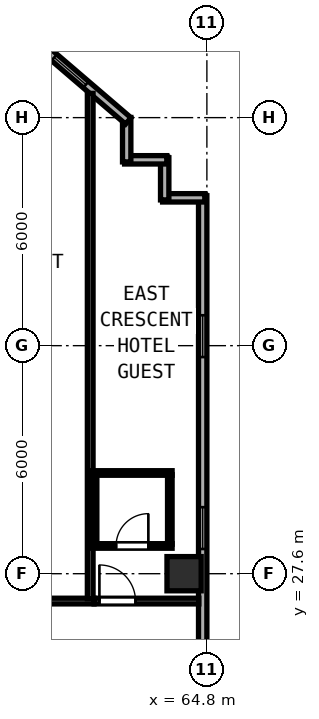
"""IFC4 building model, lengths in metres.
Left out: names, types, materials, properties, quantities, classifications, styles, units other than length and angle.
Written with IfcOpenShell. Run it as: python <this file> out.ifc"""

import sys

from ifc_helpers import new_model, si_unit, direction, frame, frame_2d, origin, origin_2d, place, context, subcontext, project, spatial, rectangle, hollow_rectangle, extrude, element, fill, save


model = new_model("IFC4")
c1 = context("Model", 3, precision=1e-05, world=origin(), true_north=direction((0.0, 1.0)))
c2 = subcontext(c1, "Body", "Model", "MODEL_VIEW")
j1 = project(units=[si_unit("LENGTHUNIT", "METRE"), si_unit("PLANEANGLEUNIT", "RADIAN")], contexts=[c1])
p1 = place(None, origin())
s1 = spatial("IfcSite", under=j1, at=p1, CompositionType="ELEMENT")
p2 = place(p1, origin())
s2 = spatial("IfcBuilding", under=s1, at=p2, CompositionType="ELEMENT")
p3 = place(p2, frame((0.0, 0.0, 215.4)))
s3 = spatial("IfcBuildingStorey", under=s2, at=p3, CompositionType="ELEMENT", Elevation=215.4)
p4 = place(p3, frame((64.2, 27.6, 0.0), z_axis=(0.0, 0.0, 1.0), x_axis=(1.0, 0.0, 0.0)))
e1 = element("IfcColumn", 1, at=p4, inside=s3, PredefinedType="COLUMN", context=c2, shape_type="SweptSolid", body=[
    extrude(hollow_rectangle(XDim=0.9, YDim=0.9, WallThickness=0.034, at=origin_2d()), origin(), (0.0, 0.0, 1.0), 3.8),
])
p5 = place(p3, frame((64.69, 16.4, 0.0), z_axis=(0.0, 0.0, 1.0), x_axis=(0.0, 1.0, 0.0)))
e2 = element("IfcWall", 2, at=p5, inside=s3, PredefinedType="SOLIDWALL", context=c2, shape_type="SweptSolid", body=[
    extrude(rectangle(XDim=21.145, YDim=0.22, at=frame_2d((10.573, 0.0))), origin(), (0.0, 0.0, 1.0), 3.62),
])
p6 = place(p5, frame((1.05, 0.0, 0.85)))
e3 = element("IfcOpeningElement", 3, at=p6, cuts=e2, PredefinedType="OPENING", context=c2, shape_type="SweptSolid", body=[
    extrude(rectangle(XDim=1.1, YDim=1.75, at=frame_2d((0.55, 0.875))), frame((0.0, 0.12, 0.0), z_axis=(0.0, -1.0, 0.0), x_axis=(1.0, 0.0, 0.0)), (0.0, 0.0, 1.0), 0.24),
])
p7 = place(p5, frame((6.1, 0.0, 0.85)))
e4 = element("IfcOpeningElement", 4, at=p7, cuts=e2, PredefinedType="OPENING", context=c2, shape_type="SweptSolid", body=[
    extrude(rectangle(XDim=1.1, YDim=1.75, at=frame_2d((0.55, 0.875))), frame((0.0, 0.12, 0.0), z_axis=(0.0, -1.0, 0.0), x_axis=(1.0, 0.0, 0.0)), (0.0, 0.0, 1.0), 0.24),
])
p8 = place(p5, frame((11.85, 0.0, 0.85)))
e5 = element("IfcOpeningElement", 5, at=p8, cuts=e2, PredefinedType="OPENING", context=c2, shape_type="SweptSolid", body=[
    extrude(rectangle(XDim=1.1, YDim=1.75, at=frame_2d((0.55, 0.875))), frame((0.0, 0.12, 0.0), z_axis=(0.0, -1.0, 0.0), x_axis=(1.0, 0.0, 0.0)), (0.0, 0.0, 1.0), 0.24),
])
p9 = place(p5, frame((16.9, 0.0, 0.85)))
e6 = element("IfcOpeningElement", 6, at=p9, cuts=e2, PredefinedType="OPENING", context=c2, shape_type="SweptSolid", body=[
    extrude(rectangle(XDim=1.1, YDim=1.75, at=frame_2d((0.55, 0.875))), frame((0.0, 0.12, 0.0), z_axis=(0.0, -1.0, 0.0), x_axis=(1.0, 0.0, 0.0)), (0.0, 0.0, 1.0), 0.24),
])
p10 = place(p3, frame((64.745, 37.49, 0.0), z_axis=(0.0, 0.0, 1.0), x_axis=(-1.0, 0.0, 0.0)))
e7 = element("IfcWall", 7, at=p10, inside=s3, PredefinedType="SOLIDWALL", context=c2, shape_type="SweptSolid", body=[
    extrude(rectangle(XDim=1.11, YDim=0.22, at=frame_2d((0.555, 0.0))), origin(), (0.0, 0.0, 1.0), 3.62),
])
p11 = place(p3, frame((63.69, 37.435, 0.0), z_axis=(0.0, 0.0, 1.0), x_axis=(0.0, 1.0, 0.0)))
e8 = element("IfcWall", 8, at=p11, inside=s3, PredefinedType="SOLIDWALL", context=c2, shape_type="SweptSolid", body=[
    extrude(rectangle(XDim=1.11, YDim=0.22, at=frame_2d((0.555, 0.0))), origin(), (0.0, 0.0, 1.0), 3.62),
])
p12 = place(p3, frame((63.745, 38.49, 0.0), z_axis=(0.0, 0.0, 1.0), x_axis=(-1.0, 0.0, 0.0)))
e9 = element("IfcWall", 9, at=p12, inside=s3, PredefinedType="SOLIDWALL", context=c2, shape_type="SweptSolid", body=[
    extrude(rectangle(XDim=1.11, YDim=0.22, at=frame_2d((0.555, 0.0))), origin(), (0.0, 0.0, 1.0), 3.62),
])
p13 = place(p3, frame((62.69, 38.435, 0.0), z_axis=(0.0, 0.0, 1.0), x_axis=(0.0, 1.0, 0.0)))
e10 = element("IfcWall", 10, at=p13, inside=s3, PredefinedType="SOLIDWALL", context=c2, shape_type="SweptSolid", body=[
    extrude(rectangle(XDim=1.169, YDim=0.22, at=frame_2d((0.585, 0.0))), origin(), (0.0, 0.0, 1.0), 3.62),
])
p14 = place(p3, frame((62.732, 39.514, 0.0), z_axis=(0.0, 0.0, 1.0), x_axis=(-0.759251976569, 0.65079677018, 0.0)))
e11 = element("IfcWall", 11, at=p14, inside=s3, PredefinedType="SOLIDWALL", context=c2, shape_type="SweptSolid", body=[
    extrude(rectangle(XDim=3.726, YDim=0.22, at=frame_2d((1.863, 0.0))), origin(), (0.0, 0.0, 1.0), 3.62),
])
p15 = place(p14, frame((1.467, 0.0, 0.85)))
e12 = element("IfcOpeningElement", 12, at=p15, cuts=e11, PredefinedType="OPENING", context=c2, shape_type="SweptSolid", body=[
    extrude(rectangle(XDim=1.1, YDim=1.75, at=frame_2d((0.55, 0.875))), frame((0.0, 0.12, 0.0), z_axis=(0.0, -1.0, 0.0), x_axis=(1.0, 0.0, 0.0)), (0.0, 0.0, 1.0), 0.24),
])
p16 = place(p3, frame((57.972, 26.88, 0.0), z_axis=(0.0, 0.0, 1.0), x_axis=(1.0, 0.0, 0.0)))
e13 = element("IfcWall", 13, at=p16, inside=s3, PredefinedType="PARTITIONING", context=c2, shape_type="SweptSolid", body=[
    extrude(rectangle(XDim=3.858, YDim=0.15, at=frame_2d((1.929, 0.0))), origin(), (0.0, 0.0, 1.0), 3.62),
])
p17 = place(p16, frame((0.14, 0.0, 0.0)))
e14 = element("IfcOpeningElement", 14, at=p17, cuts=e13, PredefinedType="OPENING", context=c2, shape_type="SweptSolid", body=[
    extrude(rectangle(XDim=0.95, YDim=2.15, at=frame_2d((0.475, 1.075))), frame((0.0, 0.085, 0.0), z_axis=(0.0, -1.0, 0.0), x_axis=(1.0, 0.0, 0.0)), (0.0, 0.0, 1.0), 0.17),
])
p18 = place(p3, frame((61.73, 26.94, 0.0), z_axis=(0.0, 0.0, 1.0), x_axis=(0.0, 1.0, 0.0)))
e15 = element("IfcWall", 15, at=p18, inside=s3, PredefinedType="PARTITIONING", context=c2, shape_type="SweptSolid", body=[
    extrude(rectangle(XDim=13.298, YDim=0.15, at=frame_2d((6.649, 0.0))), origin(), (0.0, 0.0, 1.0), 3.62),
])
p19 = place(p3, frame((61.832, 26.88, 0.0), z_axis=(0.0, 0.0, 1.0), x_axis=(1.0, 0.0, 0.0)))
e16 = element("IfcWall", 16, at=p19, inside=s3, PredefinedType="PARTITIONING", context=c2, shape_type="SweptSolid", body=[
    extrude(rectangle(XDim=2.756, YDim=0.15, at=frame_2d((1.378, 0.0))), origin(), (0.0, 0.0, 1.0), 3.62),
])
p20 = place(p19, frame((0.14, 0.0, 0.0)))
e17 = element("IfcOpeningElement", 17, at=p20, cuts=e16, PredefinedType="OPENING", context=c2, shape_type="SweptSolid", body=[
    extrude(rectangle(XDim=0.95, YDim=2.15, at=frame_2d((0.475, 1.075))), frame((0.0, 0.085, 0.0), z_axis=(0.0, -1.0, 0.0), x_axis=(1.0, 0.0, 0.0)), (0.0, 0.0, 1.0), 0.17),
])
p21 = place(p3, frame((61.79, 30.25, 0.0), z_axis=(0.0, 0.0, 1.0), x_axis=(1.0, 0.0, 0.0)))
e18 = element("IfcWall", 18, at=p21, inside=s3, PredefinedType="PARTITIONING", context=c2, shape_type="SweptSolid", body=[
    extrude(rectangle(XDim=2.095, YDim=0.12, at=frame_2d((1.047, 0.0))), origin(), (0.0, 0.0, 1.0), 3.62),
])
p22 = place(p3, frame((61.79, 28.33, 0.0), z_axis=(0.0, 0.0, 1.0), x_axis=(1.0, 0.0, 0.0)))
e19 = element("IfcWall", 19, at=p22, inside=s3, PredefinedType="PARTITIONING", context=c2, shape_type="SweptSolid", body=[
    extrude(rectangle(XDim=2.095, YDim=0.12, at=frame_2d((1.047, 0.0))), origin(), (0.0, 0.0, 1.0), 3.62),
])
p23 = place(p22, frame((0.62, 0.0, 0.0)))
e20 = element("IfcOpeningElement", 20, at=p23, cuts=e19, PredefinedType="OPENING", context=c2, shape_type="SweptSolid", body=[
    extrude(rectangle(XDim=0.85, YDim=2.1, at=frame_2d((0.425, 1.05))), frame((0.0, 0.07, 0.0), z_axis=(0.0, -1.0, 0.0), x_axis=(1.0, 0.0, 0.0)), (0.0, 0.0, 1.0), 0.14),
])
for number, where, z_axis, x_axis in (
    (21, (61.845, 28.375, 0.0), (0.0, 0.0, 1.0), (0.0, 1.0, 0.0)),
    (22, (63.825, 28.375, 0.0), (0.0, 0.0, 1.0), (0.0, 1.0, 0.0)),
):
    element("IfcWall", number, at=place(p3, frame(where, z_axis=z_axis, x_axis=x_axis)), inside=s3, PredefinedType="PARTITIONING", context=c2, shape_type="SweptSolid", body=[
        extrude(rectangle(XDim=1.83, YDim=0.12, at=frame_2d((0.915, 0.0))), origin(), (0.0, 0.0, 1.0), 3.62),
    ])
p24 = place(p8, origin())
e23 = element("IfcWindow", 23, at=p24, inside=s3, PartitioningType="SINGLE_PANEL", PredefinedType="WINDOW", context=c2, shape_type="SweptSolid", body=[
    extrude(rectangle(XDim=1.1, YDim=1.75, at=frame_2d((0.55, 0.875))), frame((0.0, 0.03, 0.0), z_axis=(0.0, -1.0, 0.0), x_axis=(1.0, 0.0, 0.0)), (0.0, 0.0, 1.0), 0.06),
])
fill(e5, e23)
p25 = place(p9, origin())
e24 = element("IfcWindow", 24, at=p25, inside=s3, PartitioningType="SINGLE_PANEL", PredefinedType="WINDOW", context=c2, shape_type="SweptSolid", body=[
    extrude(rectangle(XDim=1.1, YDim=1.75, at=frame_2d((0.55, 0.875))), frame((0.0, 0.03, 0.0), z_axis=(0.0, -1.0, 0.0), x_axis=(1.0, 0.0, 0.0)), (0.0, 0.0, 1.0), 0.06),
])
fill(e6, e24)
p26 = place(p15, origin())
e25 = element("IfcWindow", 25, at=p26, inside=s3, PartitioningType="SINGLE_PANEL", PredefinedType="WINDOW", context=c2, shape_type="SweptSolid", body=[
    extrude(rectangle(XDim=1.1, YDim=1.75, at=frame_2d((0.55, 0.875))), frame((0.0, 0.03, 0.0), z_axis=(0.0, -1.0, 0.0), x_axis=(1.0, 0.0, 0.0)), (0.0, 0.0, 1.0), 0.06),
])
fill(e12, e25)
p27 = place(p20, origin())
e26 = element("IfcDoor", 26, at=p27, inside=s3, OperationType="SINGLE_SWING_LEFT", PredefinedType="DOOR", context=c2, shape_type="SweptSolid", body=[
    extrude(rectangle(XDim=0.95, YDim=2.15, at=frame_2d((0.475, 1.075))), frame((0.0, 0.025, 0.0), z_axis=(0.0, -1.0, 0.0), x_axis=(1.0, 0.0, 0.0)), (0.0, 0.0, 1.0), 0.05),
])
fill(e17, e26)
p28 = place(p23, origin())
e27 = element("IfcDoor", 27, at=p28, inside=s3, OperationType="SINGLE_SWING_RIGHT", PredefinedType="DOOR", context=c2, shape_type="SweptSolid", body=[
    extrude(rectangle(XDim=0.85, YDim=2.1, at=frame_2d((0.425, 1.05))), frame((0.0, 0.025, 0.0), z_axis=(0.0, -1.0, 0.0), x_axis=(1.0, 0.0, 0.0)), (0.0, 0.0, 1.0), 0.05),
])
fill(e20, e27)
save(model, sys.argv[1])
